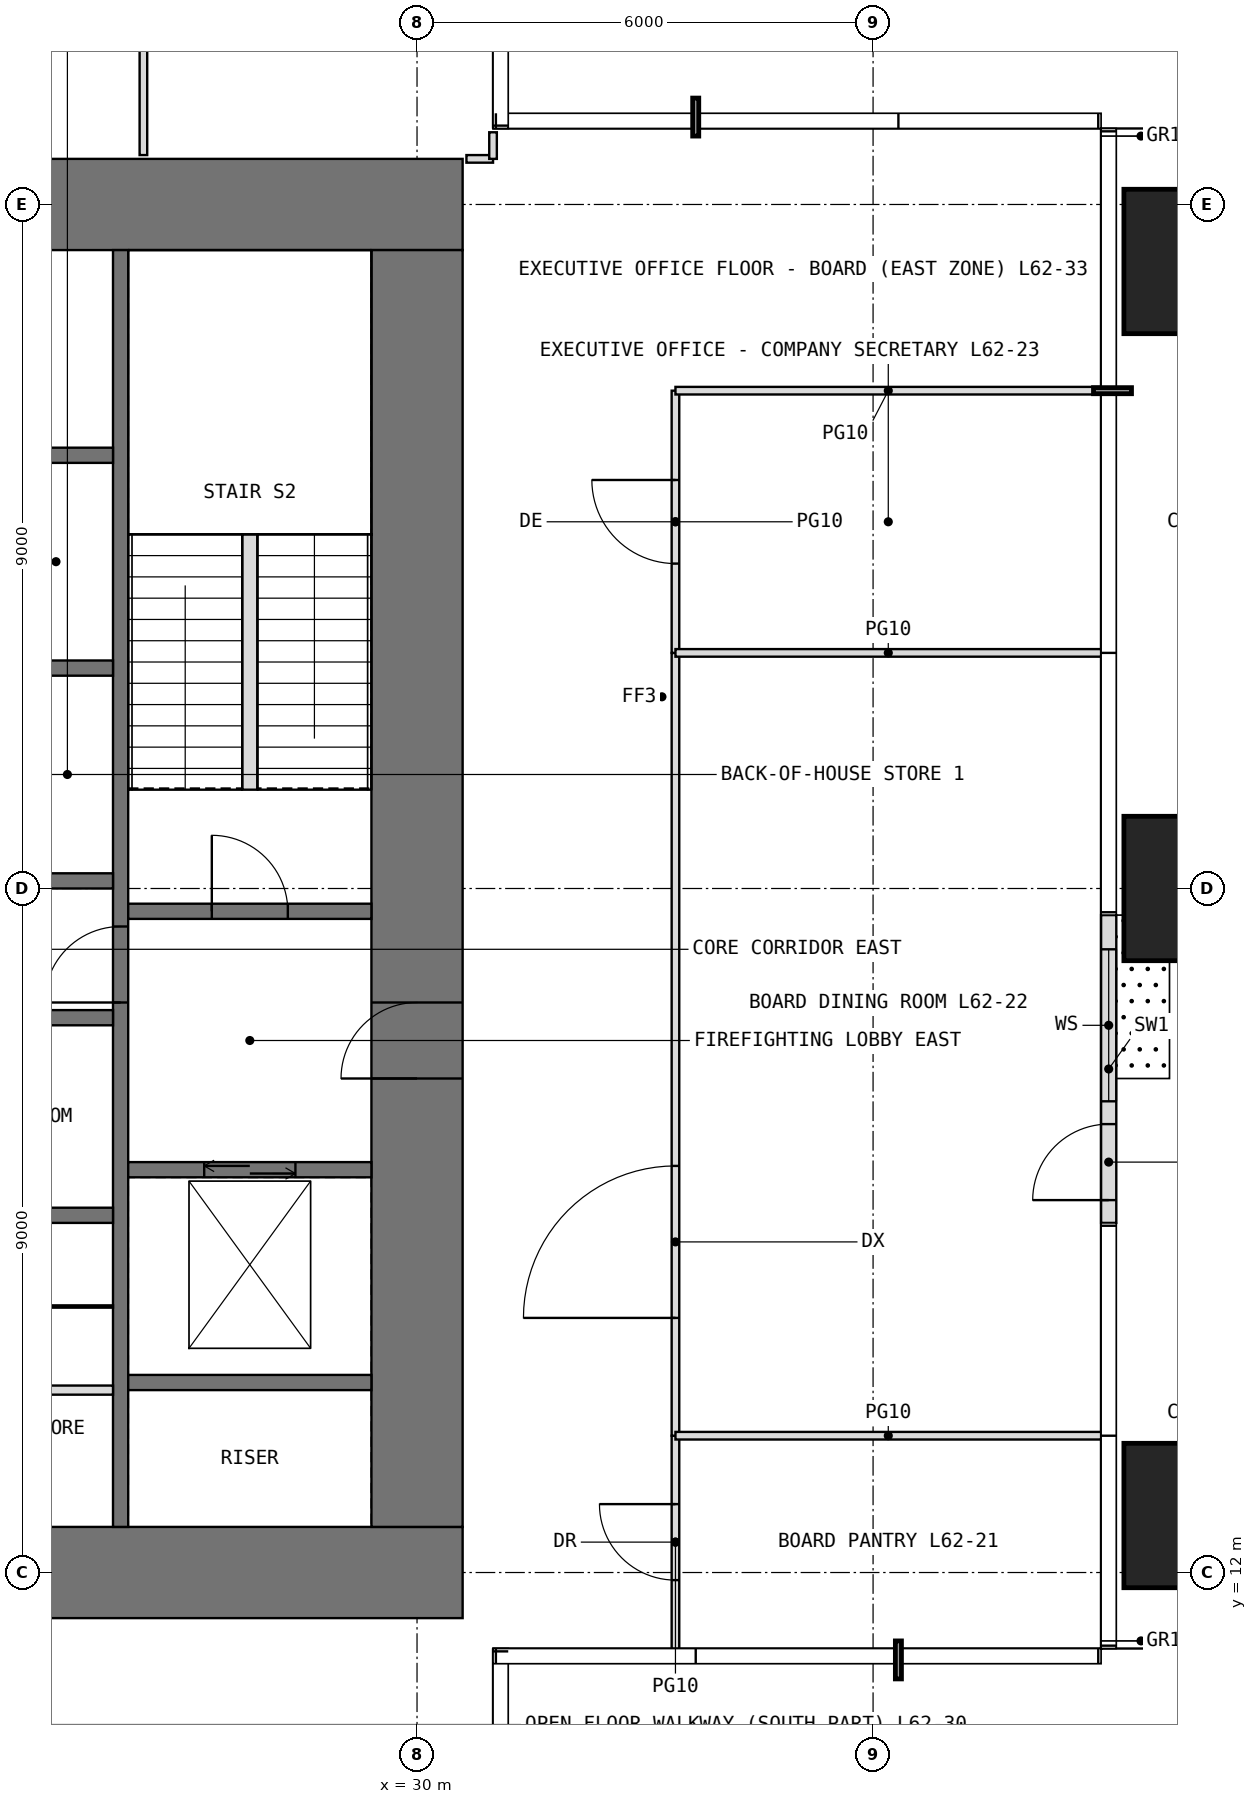
"""IFC4 building model, lengths in metres.
Left out: names, types, materials, properties, quantities, classifications, styles, units other than length and angle.
Written with IfcOpenShell. Run it as: python <this file> out.ifc"""

import sys

from ifc_helpers import new_model, si_unit, direction, frame, frame_2d, origin, origin_2d, place, context, subcontext, project, spatial, rectangle, extrude, element, fill, save


model = new_model("IFC4")
c1 = context("Model", 3, precision=1e-05, world=origin(), true_north=direction((0.0, 1.0)))
c2 = subcontext(c1, "Body", "Model", "MODEL_VIEW")
j1 = project(units=[si_unit("LENGTHUNIT", "METRE"), si_unit("PLANEANGLEUNIT", "RADIAN")], contexts=[c1])
p1 = place(None, origin())
s1 = spatial("IfcSite", under=j1, at=p1, CompositionType="ELEMENT")
p2 = place(p1, origin())
s2 = spatial("IfcBuilding", under=s1, at=p2, CompositionType="ELEMENT")
p3 = place(p2, frame((0.0, 0.0, 260.8)))
s3 = spatial("IfcBuildingStorey", under=s2, at=p3, CompositionType="ELEMENT", Elevation=260.8)
for number, where, z_axis, x_axis in (
    (1, (40.25, 12.75, 0.0), (0.0, 0.0, 1.0), (1.0, 0.0, 0.0)),
    (2, (40.25, 21.0, 0.0), (0.0, 0.0, 1.0), (1.0, 0.0, 0.0)),
    (3, (40.25, 29.25, 0.0), (0.0, 0.0, 1.0), (1.0, 0.0, 0.0)),
):
    element("IfcColumn", number, at=place(p3, frame(where, z_axis=z_axis, x_axis=x_axis)), inside=s3, PredefinedType="COLUMN", context=c2, shape_type="SweptSolid", body=[
        extrude(rectangle(XDim=1.9, YDim=1.9, at=origin_2d()), origin(), (0.0, 0.0, 1.0), 4.2),
    ])
p4 = place(p3, frame((39.1, 16.6, 0.0), z_axis=(0.0, 0.0, 1.0), x_axis=(0.0, 1.0, 0.0)))
e4 = element("IfcWall", 4, at=p4, inside=s3, PredefinedType="USERDEFINED", context=c2, shape_type="SweptSolid", body=[
    extrude(rectangle(XDim=4.05, YDim=0.2, at=frame_2d((2.025, 0.0))), origin(), (0.0, 0.0, 1.0), 3.95),
])
p5 = place(p4, frame((0.3, 0.0, 0.0)))
e5 = element("IfcOpeningElement", 5, at=p5, cuts=e4, PredefinedType="OPENING", context=c2, shape_type="SweptSolid", body=[
    extrude(rectangle(XDim=1.0, YDim=2.4, at=frame_2d((0.5, 1.2))), frame((0.0, 0.11, 0.0), z_axis=(0.0, -1.0, 0.0), x_axis=(1.0, 0.0, 0.0)), (0.0, 0.0, 1.0), 0.22),
])
p6 = place(p4, frame((1.6, 0.0, 0.3)))
e6 = element("IfcOpeningElement", 6, at=p6, cuts=e4, PredefinedType="OPENING", context=c2, shape_type="SweptSolid", body=[
    extrude(rectangle(XDim=2.0, YDim=2.7, at=frame_2d((1.0, 1.35))), frame((0.0, 0.11, 0.0), z_axis=(0.0, -1.0, 0.0), x_axis=(1.0, 0.0, 0.0)), (0.0, 0.0, 1.0), 0.22),
])
p7 = place(p3, frame((11.4, 12.0, -0.05), z_axis=(0.0, 0.0, 1.0), x_axis=(1.0, 0.0, 0.0)))
e7 = element("IfcWall", 7, at=p7, inside=s3, PredefinedType="SHEAR", context=c2, shape_type="SweptSolid", body=[
    extrude(rectangle(XDim=19.2, YDim=1.2, at=frame_2d((9.6, 0.0))), origin(), (0.0, 0.0, 1.0), 4.2),
])
p8 = place(p7, frame((8.6, 0.0, 0.05)))
e8 = element("IfcOpeningElement", 8, at=p8, cuts=e7, PredefinedType="OPENING", context=c2, shape_type="SweptSolid", body=[
    extrude(rectangle(XDim=2.0, YDim=2.2, at=frame_2d((1.0, 1.1))), frame((0.0, 0.61, 0.0), z_axis=(0.0, -1.0, 0.0), x_axis=(1.0, 0.0, 0.0)), (0.0, 0.0, 1.0), 1.22),
])
p9 = place(p3, frame((11.4, 30.0, -0.05), z_axis=(0.0, 0.0, 1.0), x_axis=(1.0, 0.0, 0.0)))
e9 = element("IfcWall", 9, at=p9, inside=s3, PredefinedType="SHEAR", context=c2, shape_type="SweptSolid", body=[
    extrude(rectangle(XDim=19.2, YDim=1.2, at=frame_2d((9.6, 0.0))), origin(), (0.0, 0.0, 1.0), 4.2),
])
p10 = place(p9, frame((8.6, 0.0, 0.05)))
e10 = element("IfcOpeningElement", 10, at=p10, cuts=e9, PredefinedType="OPENING", context=c2, shape_type="SweptSolid", body=[
    extrude(rectangle(XDim=2.0, YDim=2.2, at=frame_2d((1.0, 1.1))), frame((0.0, 0.61, 0.0), z_axis=(0.0, -1.0, 0.0), x_axis=(1.0, 0.0, 0.0)), (0.0, 0.0, 1.0), 1.22),
])
p11 = place(p3, frame((30.0, 12.6, -0.05), z_axis=(0.0, 0.0, 1.0), x_axis=(0.0, 1.0, 0.0)))
e11 = element("IfcWall", 11, at=p11, inside=s3, PredefinedType="SHEAR", context=c2, shape_type="SweptSolid", body=[
    extrude(rectangle(XDim=16.8, YDim=1.2, at=frame_2d((8.4, 0.0))), origin(), (0.0, 0.0, 1.0), 4.2),
])
p12 = place(p11, frame((5.9, 0.0, 0.05)))
e12 = element("IfcOpeningElement", 12, at=p12, cuts=e11, PredefinedType="OPENING", context=c2, shape_type="SweptSolid", body=[
    extrude(rectangle(XDim=1.0, YDim=2.2, at=frame_2d((0.5, 1.1))), frame((0.0, 0.61, 0.0), z_axis=(0.0, -1.0, 0.0), x_axis=(1.0, 0.0, 0.0)), (0.0, 0.0, 1.0), 1.22),
])
p13 = place(p3, frame((26.1, 12.6, -0.05), z_axis=(0.0, 0.0, 1.0), x_axis=(0.0, 1.0, 0.0)))
e13 = element("IfcWall", 13, at=p13, inside=s3, PredefinedType="SHEAR", context=c2, shape_type="SweptSolid", body=[
    extrude(rectangle(XDim=16.8, YDim=0.2, at=frame_2d((8.4, 0.0))), origin(), (0.0, 0.0, 1.0), 4.2),
])
p14 = place(p13, frame((6.9, 0.0, 0.05)))
e14 = element("IfcOpeningElement", 14, at=p14, cuts=e13, PredefinedType="OPENING", context=c2, shape_type="SweptSolid", body=[
    extrude(rectangle(XDim=1.0, YDim=2.2, at=frame_2d((0.5, 1.1))), frame((0.0, 0.11, 0.0), z_axis=(0.0, -1.0, 0.0), x_axis=(1.0, 0.0, 0.0)), (0.0, 0.0, 1.0), 0.22),
])
for number, where, z_axis, x_axis in (
    (15, (22.8, 16.7, -0.05), (0.0, 0.0, 1.0), (1.0, 0.0, 0.0)),
    (16, (22.8, 19.3, -0.05), (0.0, 0.0, 1.0), (1.0, 0.0, 0.0)),
    (17, (22.8, 21.1, -0.05), (0.0, 0.0, 1.0), (1.0, 0.0, 0.0)),
    (18, (22.8, 23.9, -0.05), (0.0, 0.0, 1.0), (1.0, 0.0, 0.0)),
    (19, (22.8, 26.7, -0.05), (0.0, 0.0, 1.0), (1.0, 0.0, 0.0)),
    (20, (26.2, 14.5, -0.05), (0.0, 0.0, 1.0), (1.0, 0.0, 0.0)),
):
    element("IfcWall", number, at=place(p3, frame(where, z_axis=z_axis, x_axis=x_axis)), inside=s3, PredefinedType="SHEAR", context=c2, shape_type="SweptSolid", body=[
        extrude(rectangle(XDim=3.2, YDim=0.2, at=frame_2d((1.6, 0.0))), origin(), (0.0, 0.0, 1.0), 4.2),
    ])
p15 = place(p3, frame((26.2, 17.3, -0.05), z_axis=(0.0, 0.0, 1.0), x_axis=(1.0, 0.0, 0.0)))
e21 = element("IfcWall", 21, at=p15, inside=s3, PredefinedType="SHEAR", context=c2, shape_type="SweptSolid", body=[
    extrude(rectangle(XDim=3.2, YDim=0.2, at=frame_2d((1.6, 0.0))), origin(), (0.0, 0.0, 1.0), 4.2),
])
p16 = place(p15, frame((1.0, 0.0, 0.05)))
e22 = element("IfcOpeningElement", 22, at=p16, cuts=e21, PredefinedType="OPENING", context=c2, shape_type="SweptSolid", body=[
    extrude(rectangle(XDim=1.2, YDim=2.2, at=frame_2d((0.6, 1.1))), frame((0.0, 0.11, 0.0), z_axis=(0.0, -1.0, 0.0), x_axis=(1.0, 0.0, 0.0)), (0.0, 0.0, 1.0), 0.22),
])
p17 = place(p3, frame((26.2, 20.7, -0.05), z_axis=(0.0, 0.0, 1.0), x_axis=(1.0, 0.0, 0.0)))
e23 = element("IfcWall", 23, at=p17, inside=s3, PredefinedType="SHEAR", context=c2, shape_type="SweptSolid", body=[
    extrude(rectangle(XDim=3.2, YDim=0.2, at=frame_2d((1.6, 0.0))), origin(), (0.0, 0.0, 1.0), 4.2),
])
p18 = place(p17, frame((1.1, 0.0, 0.05)))
e24 = element("IfcOpeningElement", 24, at=p18, cuts=e23, PredefinedType="OPENING", context=c2, shape_type="SweptSolid", body=[
    extrude(rectangle(XDim=1.0, YDim=2.2, at=frame_2d((0.5, 1.1))), frame((0.0, 0.11, 0.0), z_axis=(0.0, -1.0, 0.0), x_axis=(1.0, 0.0, 0.0)), (0.0, 0.0, 1.0), 0.22),
])
p19 = place(p3, frame((22.8, 14.4, 0.0), z_axis=(0.0, 0.0, 1.0), x_axis=(1.0, 0.0, 0.0)))
e25 = element("IfcWall", 25, at=p19, inside=s3, PredefinedType="PARTITIONING", context=c2, shape_type="SweptSolid", body=[
    extrude(rectangle(XDim=3.2, YDim=0.12, at=frame_2d((1.6, 0.0))), origin(), (0.0, 0.0, 1.0), 3.95),
])
p20 = place(p3, frame((24.6, 15.5, 0.0), z_axis=(0.0, 0.0, 1.0), x_axis=(1.0, 0.0, 0.0)))
e26 = element("IfcWall", 26, at=p20, inside=s3, PredefinedType="PARTITIONING", context=c2, shape_type="SweptSolid", body=[
    extrude(rectangle(XDim=1.4, YDim=0.03, at=frame_2d((0.7, 0.0))), origin(), (0.0, 0.0, 1.0), 3.95),
])
p21 = place(p3, frame((26.4, 30.65, 0.0), z_axis=(0.0, 0.0, 1.0), x_axis=(0.0, 1.0, 0.0)))
e27 = element("IfcWall", 27, at=p21, inside=s3, PredefinedType="PARTITIONING", context=c2, shape_type="SweptSolid", body=[
    extrude(rectangle(XDim=3.65, YDim=0.1, at=frame_2d((1.825, 0.0))), origin(), (0.0, 0.0, 1.0), 3.95),
])
p22 = place(p3, frame((30.65, 30.6, 0.0), z_axis=(0.0, 0.0, 1.0), x_axis=(1.0, 0.0, 0.0)))
e28 = element("IfcWall", 28, at=p22, inside=s3, PredefinedType="PARTITIONING", context=c2, shape_type="SweptSolid", body=[
    extrude(rectangle(XDim=0.35, YDim=0.1, at=frame_2d((0.175, 0.0))), origin(), (0.0, 0.0, 1.0), 3.95),
])
p23 = place(p3, frame((31.0, 30.6, 0.0), z_axis=(0.0, 0.0, 1.0), x_axis=(0.0, 1.0, 0.0)))
e29 = element("IfcWall", 29, at=p23, inside=s3, PredefinedType="PARTITIONING", context=c2, shape_type="SweptSolid", body=[
    extrude(rectangle(XDim=0.35, YDim=0.1, at=frame_2d((0.175, 0.0))), origin(), (0.0, 0.0, 1.0), 3.95),
])
p24 = place(p3, frame((33.4, 11.0, 0.0), z_axis=(0.0, 0.0, 1.0), x_axis=(0.0, 1.0, 0.0)))
e30 = element("IfcWall", 30, at=p24, inside=s3, PredefinedType="PARTITIONING", context=c2, shape_type="SweptSolid", body=[
    extrude(rectangle(XDim=2.8, YDim=0.1, at=frame_2d((1.4, 0.0))), origin(), (0.0, 0.0, 1.0), 3.95),
])
p25 = place(p24, frame((0.9, 0.0, 0.0)))
e31 = element("IfcOpeningElement", 31, at=p25, cuts=e30, PredefinedType="OPENING", context=c2, shape_type="SweptSolid", body=[
    extrude(rectangle(XDim=1.0, YDim=2.2, at=frame_2d((0.5, 1.1))), frame((0.0, 0.06, 0.0), z_axis=(0.0, -1.0, 0.0), x_axis=(1.0, 0.0, 0.0)), (0.0, 0.0, 1.0), 0.12),
])
p26 = place(p3, frame((33.4, 13.8, 0.0), z_axis=(0.0, 0.0, 1.0), x_axis=(0.0, 1.0, 0.0)))
e32 = element("IfcWall", 32, at=p26, inside=s3, PredefinedType="PARTITIONING", context=c2, shape_type="SweptSolid", body=[
    extrude(rectangle(XDim=10.3, YDim=0.1, at=frame_2d((5.15, 0.0))), origin(), (0.0, 0.0, 1.0), 3.95),
])
p27 = place(p26, frame((1.55, 0.0, 0.0)))
e33 = element("IfcOpeningElement", 33, at=p27, cuts=e32, PredefinedType="OPENING", context=c2, shape_type="SweptSolid", body=[
    extrude(rectangle(XDim=2.0, YDim=2.4, at=frame_2d((1.0, 1.2))), frame((0.0, 0.06, 0.0), z_axis=(0.0, -1.0, 0.0), x_axis=(1.0, 0.0, 0.0)), (0.0, 0.0, 1.0), 0.12),
])
p28 = place(p3, frame((33.4, 13.8, 0.0), z_axis=(0.0, 0.0, 1.0), x_axis=(1.0, 0.0, 0.0)))
e34 = element("IfcWall", 34, at=p28, inside=s3, PredefinedType="PARTITIONING", context=c2, shape_type="SweptSolid", body=[
    extrude(rectangle(XDim=5.6, YDim=0.1, at=frame_2d((2.8, 0.0))), origin(), (0.0, 0.0, 1.0), 3.95),
])
p29 = place(p3, frame((33.4, 24.1, 0.0), z_axis=(0.0, 0.0, 1.0), x_axis=(0.0, 1.0, 0.0)))
e35 = element("IfcWall", 35, at=p29, inside=s3, PredefinedType="PARTITIONING", context=c2, shape_type="SweptSolid", body=[
    extrude(rectangle(XDim=3.45, YDim=0.1, at=frame_2d((1.725, 0.0))), origin(), (0.0, 0.0, 1.0), 3.95),
])
p30 = place(p29, frame((1.175, 0.0, 0.0)))
e36 = element("IfcOpeningElement", 36, at=p30, cuts=e35, PredefinedType="OPENING", context=c2, shape_type="SweptSolid", body=[
    extrude(rectangle(XDim=1.1, YDim=2.3, at=frame_2d((0.55, 1.15))), frame((0.0, 0.06, 0.0), z_axis=(0.0, -1.0, 0.0), x_axis=(1.0, 0.0, 0.0)), (0.0, 0.0, 1.0), 0.12),
])
for number, where, z_axis, x_axis in (
    (37, (33.4, 24.1, 0.0), (0.0, 0.0, 1.0), (1.0, 0.0, 0.0)),
    (38, (33.4, 27.55, 0.0), (0.0, 0.0, 1.0), (1.0, 0.0, 0.0)),
):
    element("IfcWall", number, at=place(p3, frame(where, z_axis=z_axis, x_axis=x_axis)), inside=s3, PredefinedType="PARTITIONING", context=c2, shape_type="SweptSolid", body=[
        extrude(rectangle(XDim=5.6, YDim=0.1, at=frame_2d((2.8, 0.0))), origin(), (0.0, 0.0, 1.0), 3.95),
    ])
p31 = place(p3, frame((27.8, 22.3, 0.0), z_axis=(0.0, 0.0, 1.0), x_axis=(0.0, 1.0, 0.0)))
e39 = element("IfcWall", 39, at=p31, inside=s3, PredefinedType="PARTITIONING", context=c2, shape_type="SweptSolid", body=[
    extrude(rectangle(XDim=3.36, YDim=0.2, at=frame_2d((1.68, 0.0))), origin(), (0.0, 0.0, 1.0), 4.2),
])
p32 = place(p5, origin())
e40 = element("IfcDoor", 40, at=p32, inside=s3, OperationType="SINGLE_SWING_LEFT", PredefinedType="DOOR", context=c2, shape_type="SweptSolid", body=[
    extrude(rectangle(XDim=1.0, YDim=2.4, at=frame_2d((0.5, 1.2))), frame((0.0, 0.025, 0.0), z_axis=(0.0, -1.0, 0.0), x_axis=(1.0, 0.0, 0.0)), (0.0, 0.0, 1.0), 0.05),
])
fill(e5, e40)
p33 = place(p6, origin())
e41 = element("IfcWindow", 41, at=p33, inside=s3, PartitioningType="SINGLE_PANEL", PredefinedType="WINDOW", context=c2, shape_type="SweptSolid", body=[
    extrude(rectangle(XDim=2.0, YDim=2.7, at=frame_2d((1.0, 1.35))), frame((0.0, 0.03, 0.0), z_axis=(0.0, -1.0, 0.0), x_axis=(1.0, 0.0, 0.0)), (0.0, 0.0, 1.0), 0.06),
])
fill(e6, e41)
p34 = place(p12, origin())
e42 = element("IfcDoor", 42, at=p34, inside=s3, OperationType="SINGLE_SWING_LEFT", PredefinedType="DOOR", context=c2, shape_type="SweptSolid", body=[
    extrude(rectangle(XDim=1.0, YDim=2.2, at=frame_2d((0.5, 1.1))), frame((0.0, 0.025, 0.0), z_axis=(0.0, -1.0, 0.0), x_axis=(1.0, 0.0, 0.0)), (0.0, 0.0, 1.0), 0.05),
])
fill(e12, e42)
p35 = place(p18, origin())
e43 = element("IfcDoor", 43, at=p35, inside=s3, OperationType="SINGLE_SWING_LEFT", PredefinedType="DOOR", context=c2, shape_type="SweptSolid", body=[
    extrude(rectangle(XDim=1.0, YDim=2.2, at=frame_2d((0.5, 1.1))), frame((0.0, 0.025, 0.0), z_axis=(0.0, -1.0, 0.0), x_axis=(1.0, 0.0, 0.0)), (0.0, 0.0, 1.0), 0.05),
])
fill(e24, e43)
p36 = place(p14, origin())
e44 = element("IfcDoor", 44, at=p36, inside=s3, OperationType="SINGLE_SWING_LEFT", PredefinedType="DOOR", context=c2, shape_type="SweptSolid", body=[
    extrude(rectangle(XDim=1.0, YDim=2.2, at=frame_2d((0.5, 1.1))), frame((0.0, 0.025, 0.0), z_axis=(0.0, -1.0, 0.0), x_axis=(1.0, 0.0, 0.0)), (0.0, 0.0, 1.0), 0.05),
])
fill(e14, e44)
p37 = place(p25, origin())
e45 = element("IfcDoor", 45, at=p37, inside=s3, OperationType="SINGLE_SWING_RIGHT", PredefinedType="DOOR", context=c2, shape_type="SweptSolid", body=[
    extrude(rectangle(XDim=1.0, YDim=2.2, at=frame_2d((0.5, 1.1))), frame((0.0, 0.025, 0.0), z_axis=(0.0, -1.0, 0.0), x_axis=(1.0, 0.0, 0.0)), (0.0, 0.0, 1.0), 0.05),
])
fill(e31, e45)
p38 = place(p27, origin())
e46 = element("IfcDoor", 46, at=p38, inside=s3, OperationType="DOUBLE_DOOR_SINGLE_SWING", PredefinedType="DOOR", context=c2, shape_type="SweptSolid", body=[
    extrude(rectangle(XDim=2.0, YDim=2.4, at=frame_2d((1.0, 1.2))), frame((0.0, 0.025, 0.0), z_axis=(0.0, -1.0, 0.0), x_axis=(1.0, 0.0, 0.0)), (0.0, 0.0, 1.0), 0.05),
])
fill(e33, e46)
p39 = place(p30, origin())
e47 = element("IfcDoor", 47, at=p39, inside=s3, OperationType="SINGLE_SWING_RIGHT", PredefinedType="DOOR", context=c2, shape_type="SweptSolid", body=[
    extrude(rectangle(XDim=1.1, YDim=2.3, at=frame_2d((0.55, 1.15))), frame((0.0, 0.025, 0.0), z_axis=(0.0, -1.0, 0.0), x_axis=(1.0, 0.0, 0.0)), (0.0, 0.0, 1.0), 0.05),
])
fill(e36, e47)
p40 = place(p16, origin())
e48 = element("IfcDoor", 48, at=p40, inside=s3, OperationType="DOUBLE_DOOR_SLIDING", PredefinedType="DOOR", context=c2, shape_type="SweptSolid", body=[
    extrude(rectangle(XDim=1.2, YDim=2.2, at=frame_2d((0.6, 1.1))), frame((0.0, 0.025, 0.0), z_axis=(0.0, -1.0, 0.0), x_axis=(1.0, 0.0, 0.0)), (0.0, 0.0, 1.0), 0.05),
])
fill(e22, e48)
save(model, sys.argv[1])
